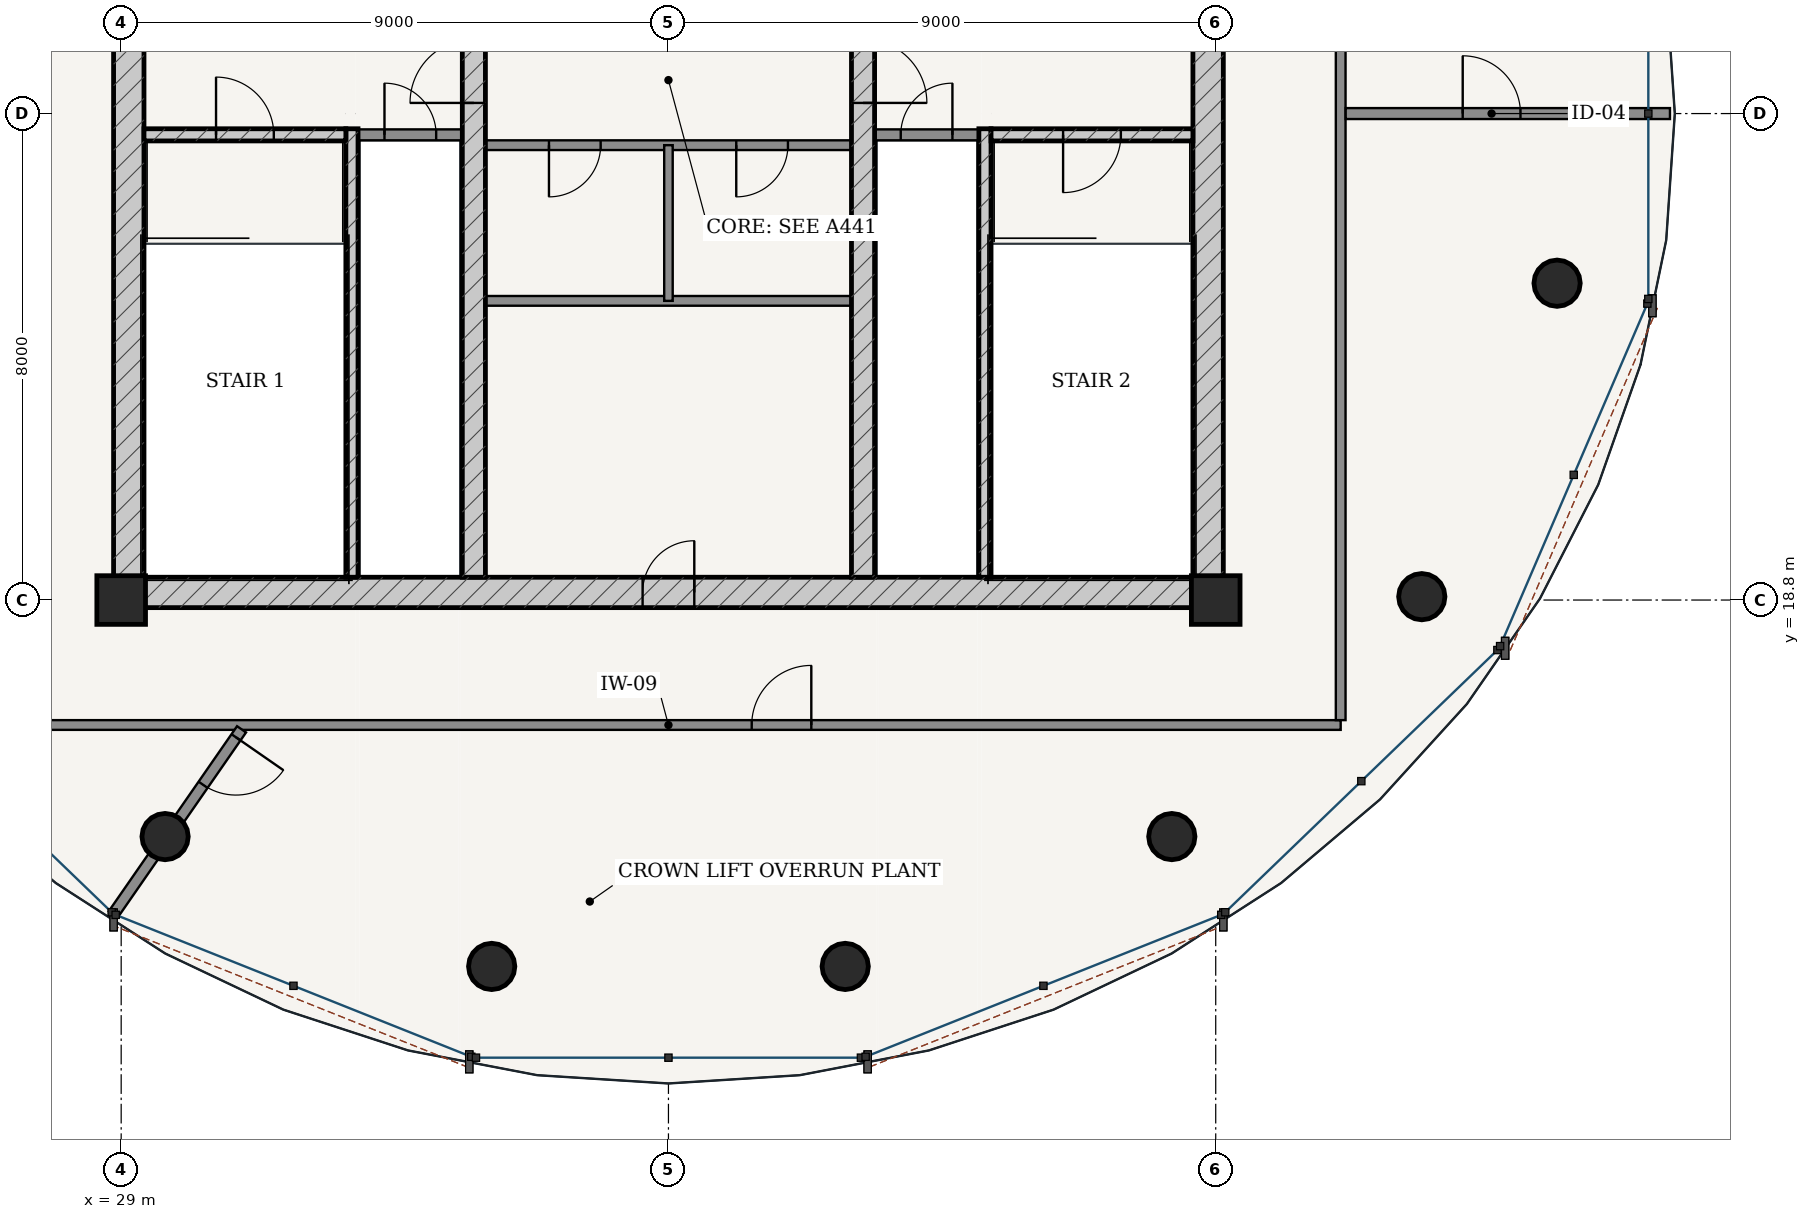
"""IFC4 building model, lengths in metres.
Left out: names, types, materials, properties, quantities, classifications, styles, units other than length and angle.
Written with IfcOpenShell. Run it as: python <this file> out.ifc"""

import sys

from ifc_helpers import new_model, si_unit, direction, frame, frame_2d, origin, origin_2d, place, context, subcontext, project, spatial, rectangle, hollow_circle, extrude, source, transform, mapped, element, fill, save


model = new_model("IFC4")
c1 = context("Model", 3, precision=1e-05, world=origin(), true_north=direction((-0.2419218956, 0.970295726276)))
c2 = subcontext(c1, "Body", "Model", "MODEL_VIEW")
j1 = project(units=[si_unit("LENGTHUNIT", "METRE"), si_unit("PLANEANGLEUNIT", "RADIAN")], contexts=[c1])
p1 = place(None, origin())
s1 = spatial("IfcSite", under=j1, at=p1, CompositionType="ELEMENT")
p2 = place(p1, origin())
s2 = spatial("IfcBuilding", under=s1, at=p2, CompositionType="ELEMENT")
p3 = place(p2, frame((0.0, 0.0, 332.1)))
s3 = spatial("IfcBuildingStorey", under=s2, at=p3, CompositionType="ELEMENT", Elevation=332.1)
for number, where, z_axis, x_axis in (
    (1, (29.0, 18.8, 0.0), (0.0, 0.0, 1.0), (1.0, 0.0, 0.0)),
    (2, (47.0, 18.8, 0.0), (0.0, 0.0, 1.0), (1.0, 0.0, 0.0)),
):
    element("IfcColumn", number, at=place(p3, frame(where, z_axis=z_axis, x_axis=x_axis)), inside=s3, PredefinedType="COLUMN", context=c2, shape_type="SweptSolid", body=[
        extrude(rectangle(XDim=0.8, YDim=0.8, at=origin_2d()), origin(), (0.0, 0.0, 1.0), 5.2),
    ])
p4 = place(p3, frame((28.875, 18.925, 0.0), z_axis=(0.0, 0.0, 1.0), x_axis=(1.0, 0.0, 0.0)))
e3 = element("IfcWall", 3, at=p4, inside=s3, PredefinedType="SHEAR", context=c2, shape_type="SweptSolid", body=[
    extrude(rectangle(XDim=18.25, YDim=0.5, at=frame_2d((9.125, 0.0))), origin(), (0.0, 0.0, 1.0), 4.85),
])
p5 = place(p4, frame((8.7, 0.0, 0.0)))
e4 = element("IfcOpeningElement", 4, at=p5, cuts=e3, PredefinedType="OPENING", context=c2, shape_type="SweptSolid", body=[
    extrude(rectangle(XDim=0.85, YDim=2.1, at=frame_2d((0.425, 1.05))), frame((0.0, 0.26, 0.0), z_axis=(0.0, -1.0, 0.0), x_axis=(1.0, 0.0, 0.0)), (0.0, 0.0, 1.0), 0.52),
])
p6 = place(p3, frame((29.125, 19.175, 0.0), z_axis=(0.0, 0.0, 1.0), x_axis=(0.0, 1.0, 0.0)))
e5 = element("IfcWall", 5, at=p6, inside=s3, PredefinedType="SHEAR", context=c2, shape_type="SweptSolid", body=[
    extrude(rectangle(XDim=15.25, YDim=0.5, at=frame_2d((7.625, 0.0))), origin(), (0.0, 0.0, 1.0), 4.85),
])
p7 = place(p6, frame((9.875, 0.0, 0.0)))
e6 = element("IfcOpeningElement", 6, at=p7, cuts=e5, PredefinedType="OPENING", context=c2, shape_type="SweptSolid", body=[
    extrude(rectangle(XDim=1.5, YDim=2.2, at=frame_2d((0.75, 1.1))), frame((0.0, 0.26, 0.0), z_axis=(0.0, -1.0, 0.0), x_axis=(1.0, 0.0, 0.0)), (0.0, 0.0, 1.0), 0.52),
])
p8 = place(p3, frame((46.875, 19.175, 0.0), z_axis=(0.0, 0.0, 1.0), x_axis=(0.0, 1.0, 0.0)))
e7 = element("IfcWall", 7, at=p8, inside=s3, PredefinedType="SHEAR", context=c2, shape_type="SweptSolid", body=[
    extrude(rectangle(XDim=15.25, YDim=0.5, at=frame_2d((7.625, 0.0))), origin(), (0.0, 0.0, 1.0), 4.85),
])
p9 = place(p8, frame((9.875, 0.0, 0.0)))
e8 = element("IfcOpeningElement", 8, at=p9, cuts=e7, PredefinedType="OPENING", context=c2, shape_type="SweptSolid", body=[
    extrude(rectangle(XDim=1.5, YDim=2.2, at=frame_2d((0.75, 1.1))), frame((0.0, 0.26, 0.0), z_axis=(0.0, -1.0, 0.0), x_axis=(1.0, 0.0, 0.0)), (0.0, 0.0, 1.0), 0.52),
])
p10 = place(p3, frame((32.795, 19.175, 0.0), z_axis=(0.0, 0.0, 1.0), x_axis=(0.0, 1.0, 0.0)))
e9 = element("IfcWall", 9, at=p10, inside=s3, PredefinedType="SOLIDWALL", context=c2, shape_type="SweptSolid", body=[
    extrude(rectangle(XDim=7.375, YDim=0.2, at=frame_2d((3.688, 0.0))), origin(), (0.0, 0.0, 1.0), 4.85),
])
p11 = place(p3, frame((29.375, 26.45, 0.0), z_axis=(0.0, 0.0, 1.0), x_axis=(1.0, 0.0, 0.0)))
e10 = element("IfcWall", 10, at=p11, inside=s3, PredefinedType="SOLIDWALL", context=c2, shape_type="SweptSolid", body=[
    extrude(rectangle(XDim=3.32, YDim=0.2, at=frame_2d((1.66, 0.0))), origin(), (0.0, 0.0, 1.0), 4.85),
])
p12 = place(p11, frame((1.185, 0.0, 0.0)))
e11 = element("IfcOpeningElement", 11, at=p12, cuts=e10, PredefinedType="OPENING", context=c2, shape_type="SweptSolid", body=[
    extrude(rectangle(XDim=0.95, YDim=2.15, at=frame_2d((0.475, 1.075))), frame((0.0, 0.11, 0.0), z_axis=(0.0, -1.0, 0.0), x_axis=(1.0, 0.0, 0.0)), (0.0, 0.0, 1.0), 0.22),
])
p13 = place(p3, frame((43.205, 19.175, 0.0), z_axis=(0.0, 0.0, 1.0), x_axis=(0.0, 1.0, 0.0)))
e12 = element("IfcWall", 12, at=p13, inside=s3, PredefinedType="SOLIDWALL", context=c2, shape_type="SweptSolid", body=[
    extrude(rectangle(XDim=7.375, YDim=0.2, at=frame_2d((3.688, 0.0))), origin(), (0.0, 0.0, 1.0), 4.85),
])
p14 = place(p3, frame((43.305, 26.45, 0.0), z_axis=(0.0, 0.0, 1.0), x_axis=(1.0, 0.0, 0.0)))
e13 = element("IfcWall", 13, at=p14, inside=s3, PredefinedType="SOLIDWALL", context=c2, shape_type="SweptSolid", body=[
    extrude(rectangle(XDim=3.32, YDim=0.2, at=frame_2d((1.66, 0.0))), origin(), (0.0, 0.0, 1.0), 4.85),
])
p15 = place(p14, frame((1.185, 0.0, 0.0)))
e14 = element("IfcOpeningElement", 14, at=p15, cuts=e13, PredefinedType="OPENING", context=c2, shape_type="SweptSolid", body=[
    extrude(rectangle(XDim=0.95, YDim=2.15, at=frame_2d((0.475, 1.075))), frame((0.0, 0.11, 0.0), z_axis=(0.0, -1.0, 0.0), x_axis=(1.0, 0.0, 0.0)), (0.0, 0.0, 1.0), 0.22),
])
p16 = place(p3, frame((34.8, 19.175, 0.0), z_axis=(0.0, 0.0, 1.0), x_axis=(0.0, 1.0, 0.0)))
e15 = element("IfcWall", 15, at=p16, inside=s3, PredefinedType="SHEAR", context=c2, shape_type="SweptSolid", body=[
    extrude(rectangle(XDim=15.25, YDim=0.38, at=frame_2d((7.625, 0.0))), origin(), (0.0, 0.0, 1.0), 4.85),
])
p17 = place(p16, frame((7.8, 0.0, 0.0)))
e16 = element("IfcOpeningElement", 16, at=p17, cuts=e15, PredefinedType="OPENING", context=c2, shape_type="SweptSolid", body=[
    extrude(rectangle(XDim=1.05, YDim=2.15, at=frame_2d((0.525, 1.075))), frame((0.0, 0.2, 0.0), z_axis=(0.0, -1.0, 0.0), x_axis=(1.0, 0.0, 0.0)), (0.0, 0.0, 1.0), 0.4),
])
p18 = place(p3, frame((41.2, 19.175, 0.0), z_axis=(0.0, 0.0, 1.0), x_axis=(0.0, 1.0, 0.0)))
e17 = element("IfcWall", 17, at=p18, inside=s3, PredefinedType="SHEAR", context=c2, shape_type="SweptSolid", body=[
    extrude(rectangle(XDim=15.25, YDim=0.38, at=frame_2d((7.625, 0.0))), origin(), (0.0, 0.0, 1.0), 4.85),
])
p19 = place(p18, frame((7.8, 0.0, 0.0)))
e18 = element("IfcOpeningElement", 18, at=p19, cuts=e17, PredefinedType="OPENING", context=c2, shape_type="SweptSolid", body=[
    extrude(rectangle(XDim=1.05, YDim=2.15, at=frame_2d((0.525, 1.075))), frame((0.0, 0.2, 0.0), z_axis=(0.0, -1.0, 0.0), x_axis=(1.0, 0.0, 0.0)), (0.0, 0.0, 1.0), 0.4),
])
for number, where, z_axis, x_axis in (
    (19, (29.722, 14.91, 0.0), (0.0, 0.0, 1.0), (1.0, 0.0, 0.0)),
    (20, (35.093, 12.775, 0.0), (0.0, 0.0, 1.0), (1.0, 0.0, 0.0)),
    (21, (40.907, 12.775, 0.0), (0.0, 0.0, 1.0), (1.0, 0.0, 0.0)),
    (22, (46.278, 14.91, 0.0), (0.0, 0.0, 1.0), (1.0, 0.0, 0.0)),
    (23, (50.389, 18.855, 0.0), (0.0, 0.0, 1.0), (1.0, 0.0, 0.0)),
    (24, (52.614, 24.01, 0.0), (0.0, 0.0, 1.0), (1.0, 0.0, 0.0)),
):
    element("IfcColumn", number, at=place(p3, frame(where, z_axis=z_axis, x_axis=x_axis)), inside=s3, PredefinedType="COLUMN", context=c2, shape_type="SweptSolid", body=[
        extrude(hollow_circle(Radius=0.381, WallThickness=0.028, at=origin_2d()), origin(), (0.0, 0.0, 1.0), 5.2),
    ])
p20 = place(p3, frame((32.9, 26.45, 0.0), z_axis=(0.0, 0.0, 1.0), x_axis=(1.0, 0.0, 0.0)))
e25 = element("IfcWall", 25, at=p20, inside=s3, PredefinedType="PARTITIONING", context=c2, shape_type="SweptSolid", body=[
    extrude(rectangle(XDim=1.71, YDim=0.18, at=frame_2d((0.855, 0.0))), origin(), (0.0, 0.0, 1.0), 4.85),
])
p21 = place(p20, frame((0.43, 0.0, 0.0)))
e26 = element("IfcOpeningElement", 26, at=p21, cuts=e25, PredefinedType="OPENING", context=c2, shape_type="SweptSolid", body=[
    extrude(rectangle(XDim=0.85, YDim=2.1, at=frame_2d((0.425, 1.05))), frame((0.0, 0.1, 0.0), z_axis=(0.0, -1.0, 0.0), x_axis=(1.0, 0.0, 0.0)), (0.0, 0.0, 1.0), 0.2),
])
p22 = place(p3, frame((41.39, 26.45, 0.0), z_axis=(0.0, 0.0, 1.0), x_axis=(1.0, 0.0, 0.0)))
e27 = element("IfcWall", 27, at=p22, inside=s3, PredefinedType="PARTITIONING", context=c2, shape_type="SweptSolid", body=[
    extrude(rectangle(XDim=1.71, YDim=0.18, at=frame_2d((0.855, 0.0))), origin(), (0.0, 0.0, 1.0), 4.85),
])
p23 = place(p22, frame((0.43, 0.0, 0.0)))
e28 = element("IfcOpeningElement", 28, at=p23, cuts=e27, PredefinedType="OPENING", context=c2, shape_type="SweptSolid", body=[
    extrude(rectangle(XDim=0.85, YDim=2.1, at=frame_2d((0.425, 1.05))), frame((0.0, 0.1, 0.0), z_axis=(0.0, -1.0, 0.0), x_axis=(1.0, 0.0, 0.0)), (0.0, 0.0, 1.0), 0.2),
])
p24 = place(p3, frame((34.99, 26.28, 0.0), z_axis=(0.0, 0.0, 1.0), x_axis=(1.0, 0.0, 0.0)))
e29 = element("IfcWall", 29, at=p24, inside=s3, PredefinedType="PARTITIONING", context=c2, shape_type="SweptSolid", body=[
    extrude(rectangle(XDim=6.02, YDim=0.16, at=frame_2d((3.01, 0.0))), origin(), (0.0, 0.0, 1.0), 4.85),
])
p25 = place(p24, frame((1.045, 0.0, 0.0)))
e30 = element("IfcOpeningElement", 30, at=p25, cuts=e29, PredefinedType="OPENING", context=c2, shape_type="SweptSolid", body=[
    extrude(rectangle(XDim=0.85, YDim=2.1, at=frame_2d((0.425, 1.05))), frame((0.0, 0.09, 0.0), z_axis=(0.0, -1.0, 0.0), x_axis=(1.0, 0.0, 0.0)), (0.0, 0.0, 1.0), 0.18),
])
p26 = place(p24, frame((4.125, 0.0, 0.0)))
e31 = element("IfcOpeningElement", 31, at=p26, cuts=e29, PredefinedType="OPENING", context=c2, shape_type="SweptSolid", body=[
    extrude(rectangle(XDim=0.85, YDim=2.1, at=frame_2d((0.425, 1.05))), frame((0.0, 0.09, 0.0), z_axis=(0.0, -1.0, 0.0), x_axis=(1.0, 0.0, 0.0)), (0.0, 0.0, 1.0), 0.18),
])
p27 = place(p3, frame((34.99, 23.72, 0.0), z_axis=(0.0, 0.0, 1.0), x_axis=(1.0, 0.0, 0.0)))
e32 = element("IfcWall", 32, at=p27, inside=s3, PredefinedType="PARTITIONING", context=c2, shape_type="SweptSolid", body=[
    extrude(rectangle(XDim=6.02, YDim=0.16, at=frame_2d((3.01, 0.0))), origin(), (0.0, 0.0, 1.0), 4.85),
])
p28 = place(p3, frame((38.0, 23.72, 0.0), z_axis=(0.0, 0.0, 1.0), x_axis=(0.0, 1.0, 0.0)))
e33 = element("IfcWall", 33, at=p28, inside=s3, PredefinedType="PARTITIONING", context=c2, shape_type="SweptSolid", body=[
    extrude(rectangle(XDim=2.56, YDim=0.14, at=frame_2d((1.28, 0.0))), origin(), (0.0, 0.0, 1.0), 4.85),
])
p29 = place(p3, frame((26.945, 16.745, 0.0), z_axis=(0.0, 0.0, 1.0), x_axis=(1.0, 0.0, 0.0)))
e34 = element("IfcWall", 34, at=p29, inside=s3, PredefinedType="PARTITIONING", context=c2, shape_type="SweptSolid", body=[
    extrude(rectangle(XDim=22.11, YDim=0.16, at=frame_2d((11.055, 0.0))), origin(), (0.0, 0.0, 1.0), 4.422),
])
p30 = place(p29, frame((12.424, 0.0, 0.0)))
e35 = element("IfcOpeningElement", 35, at=p30, cuts=e34, PredefinedType="OPENING", context=c2, shape_type="SweptSolid", body=[
    extrude(rectangle(XDim=0.98, YDim=2.2, at=frame_2d((0.49, 1.1))), frame((0.0, 0.09, 0.0), z_axis=(0.0, -1.0, 0.0), x_axis=(1.0, 0.0, 0.0)), (0.0, 0.0, 1.0), 0.18),
])
p31 = place(p3, frame((49.055, 16.825, 0.0), z_axis=(0.0, 0.0, 1.0), x_axis=(0.0, 1.0, 0.0)))
e36 = element("IfcWall", 36, at=p31, inside=s3, PredefinedType="PARTITIONING", context=c2, shape_type="SweptSolid", body=[
    extrude(rectangle(XDim=19.95, YDim=0.16, at=frame_2d((9.975, 0.0))), origin(), (0.0, 0.0, 1.0), 4.422),
])
p32 = place(p3, frame((49.137, 26.8, 0.0), z_axis=(0.0, 0.0, 1.0), x_axis=(1.0, 0.0, 0.0)))
e37 = element("IfcWall", 37, at=p32, inside=s3, PredefinedType="PARTITIONING", context=c2, shape_type="SweptSolid", body=[
    extrude(rectangle(XDim=5.333, YDim=0.18, at=frame_2d((2.667, 0.0))), origin(), (0.0, 0.0, 1.0), 4.481),
])
p33 = place(p32, frame((1.925, 0.0, 0.0)))
e38 = element("IfcOpeningElement", 38, at=p33, cuts=e37, PredefinedType="OPENING", context=c2, shape_type="SweptSolid", body=[
    extrude(rectangle(XDim=0.95, YDim=2.15, at=frame_2d((0.475, 1.075))), frame((0.0, 0.1, 0.0), z_axis=(0.0, -1.0, 0.0), x_axis=(1.0, 0.0, 0.0)), (0.0, 0.0, 1.0), 0.2),
])
p34 = place(p3, frame((30.979, 16.674, 0.0), z_axis=(0.0, 0.0, 1.0), x_axis=(-0.569738046405, -0.82182635543, 0.0)))
e39 = element("IfcWall", 39, at=p34, inside=s3, PredefinedType="PARTITIONING", context=c2, shape_type="SweptSolid", body=[
    extrude(rectangle(XDim=3.701, YDim=0.18, at=frame_2d((1.851, 0.0))), origin(), (0.0, 0.0, 1.0), 4.422),
])
p35 = place(p34, frame((0.16, 0.0, 0.0)))
e40 = element("IfcOpeningElement", 40, at=p35, cuts=e39, PredefinedType="OPENING", context=c2, shape_type="SweptSolid", body=[
    extrude(rectangle(XDim=0.95, YDim=2.15, at=frame_2d((0.475, 1.075))), frame((0.0, 0.1, 0.0), z_axis=(0.0, -1.0, 0.0), x_axis=(1.0, 0.0, 0.0)), (0.0, 0.0, 1.0), 0.2),
])
m1 = source(origin(), c2, "Body", "SweptSolid", [
    extrude(rectangle(XDim=1.05, YDim=2.15, at=frame_2d((0.525, 1.075))), frame((0.0, 0.025, 0.0), z_axis=(0.0, -1.0, 0.0), x_axis=(1.0, 0.0, 0.0)), (0.0, 0.0, 1.0), 0.05),
])
p36 = place(p17, origin())
e41 = element("IfcDoor", 41, at=p36, inside=s3, OperationType="SINGLE_SWING_LEFT", PredefinedType="DOOR", context=c2, shape_type="MappedRepresentation", body=[
    mapped(m1, transform((0.0, 0.0, 0.0), scale=1.0)),
])
fill(e16, e41)
p37 = place(p19, frame((1.05, 0.0, 0.0), z_axis=(0.0, 0.0, 1.0), x_axis=(-1.0, 0.0, 0.0)))
e42 = element("IfcDoor", 42, at=p37, inside=s3, OperationType="SINGLE_SWING_RIGHT", PredefinedType="DOOR", context=c2, shape_type="MappedRepresentation", body=[
    mapped(m1, transform((0.0, 0.0, 0.0), scale=1.0)),
])
fill(e18, e42)
m2 = source(origin(), c2, "Body", "SweptSolid", [
    extrude(rectangle(XDim=0.95, YDim=2.15, at=frame_2d((0.475, 1.075))), frame((0.0, 0.025, 0.0), z_axis=(0.0, -1.0, 0.0), x_axis=(1.0, 0.0, 0.0)), (0.0, 0.0, 1.0), 0.05),
])
p38 = place(p12, origin())
e43 = element("IfcDoor", 43, at=p38, inside=s3, OperationType="SINGLE_SWING_LEFT", PredefinedType="DOOR", context=c2, shape_type="MappedRepresentation", body=[
    mapped(m2, transform((0.0, 0.0, 0.0), scale=1.0)),
])
fill(e11, e43)
p39 = place(p15, frame((0.95, 0.0, 0.0), z_axis=(0.0, 0.0, 1.0), x_axis=(-1.0, 0.0, 0.0)))
e44 = element("IfcDoor", 44, at=p39, inside=s3, OperationType="SINGLE_SWING_RIGHT", PredefinedType="DOOR", context=c2, shape_type="MappedRepresentation", body=[
    mapped(m2, transform((0.0, 0.0, 0.0), scale=1.0)),
])
fill(e14, e44)
m3 = source(origin(), c2, "Body", "SweptSolid", [
    extrude(rectangle(XDim=0.85, YDim=2.1, at=frame_2d((0.425, 1.05))), frame((0.0, 0.025, 0.0), z_axis=(0.0, -1.0, 0.0), x_axis=(1.0, 0.0, 0.0)), (0.0, 0.0, 1.0), 0.05),
])
p40 = place(p21, origin())
e45 = element("IfcDoor", 45, at=p40, inside=s3, OperationType="SINGLE_SWING_LEFT", PredefinedType="DOOR", context=c2, shape_type="MappedRepresentation", body=[
    mapped(m3, transform((0.0, 0.0, 0.0), scale=1.0)),
])
fill(e26, e45)
p41 = place(p23, origin())
e46 = element("IfcDoor", 46, at=p41, inside=s3, OperationType="SINGLE_SWING_RIGHT", PredefinedType="DOOR", context=c2, shape_type="MappedRepresentation", body=[
    mapped(m3, transform((0.0, 0.0, 0.0), scale=1.0)),
])
fill(e28, e46)
p42 = place(p25, frame((0.85, 0.0, 0.0), z_axis=(0.0, 0.0, 1.0), x_axis=(-1.0, 0.0, 0.0)))
e47 = element("IfcDoor", 47, at=p42, inside=s3, OperationType="SINGLE_SWING_RIGHT", PredefinedType="DOOR", context=c2, shape_type="MappedRepresentation", body=[
    mapped(m3, transform((0.0, 0.0, 0.0), scale=1.0)),
])
fill(e30, e47)
p43 = place(p26, frame((0.85, 0.0, 0.0), z_axis=(0.0, 0.0, 1.0), x_axis=(-1.0, 0.0, 0.0)))
e48 = element("IfcDoor", 48, at=p43, inside=s3, OperationType="SINGLE_SWING_RIGHT", PredefinedType="DOOR", context=c2, shape_type="MappedRepresentation", body=[
    mapped(m3, transform((0.0, 0.0, 0.0), scale=1.0)),
])
fill(e31, e48)
p44 = place(p5, origin())
e49 = element("IfcDoor", 49, at=p44, inside=s3, OperationType="SINGLE_SWING_RIGHT", PredefinedType="DOOR", context=c2, shape_type="MappedRepresentation", body=[
    mapped(m3, transform((0.0, 0.0, 0.0), scale=1.0)),
])
fill(e4, e49)
m4 = source(origin(), c2, "Body", "SweptSolid", [
    extrude(rectangle(XDim=0.98, YDim=2.2, at=frame_2d((0.49, 1.1))), frame((0.0, 0.025, 0.0), z_axis=(0.0, -1.0, 0.0), x_axis=(1.0, 0.0, 0.0)), (0.0, 0.0, 1.0), 0.05),
])
p45 = place(p30, origin())
e50 = element("IfcDoor", 50, at=p45, inside=s3, OperationType="SINGLE_SWING_RIGHT", PredefinedType="DOOR", context=c2, shape_type="MappedRepresentation", body=[
    mapped(m4, transform((0.0, 0.0, 0.0), scale=1.0)),
])
fill(e35, e50)
p46 = place(p33, origin())
e51 = element("IfcDoor", 51, at=p46, inside=s3, OperationType="SINGLE_SWING_LEFT", PredefinedType="DOOR", context=c2, shape_type="MappedRepresentation", body=[
    mapped(m2, transform((0.0, 0.0, 0.0), scale=1.0)),
])
fill(e38, e51)
p47 = place(p35, origin())
e52 = element("IfcDoor", 52, at=p47, inside=s3, OperationType="SINGLE_SWING_LEFT", PredefinedType="DOOR", context=c2, shape_type="MappedRepresentation", body=[
    mapped(m2, transform((0.0, 0.0, 0.0), scale=1.0)),
])
fill(e40, e52)
save(model, sys.argv[1])
